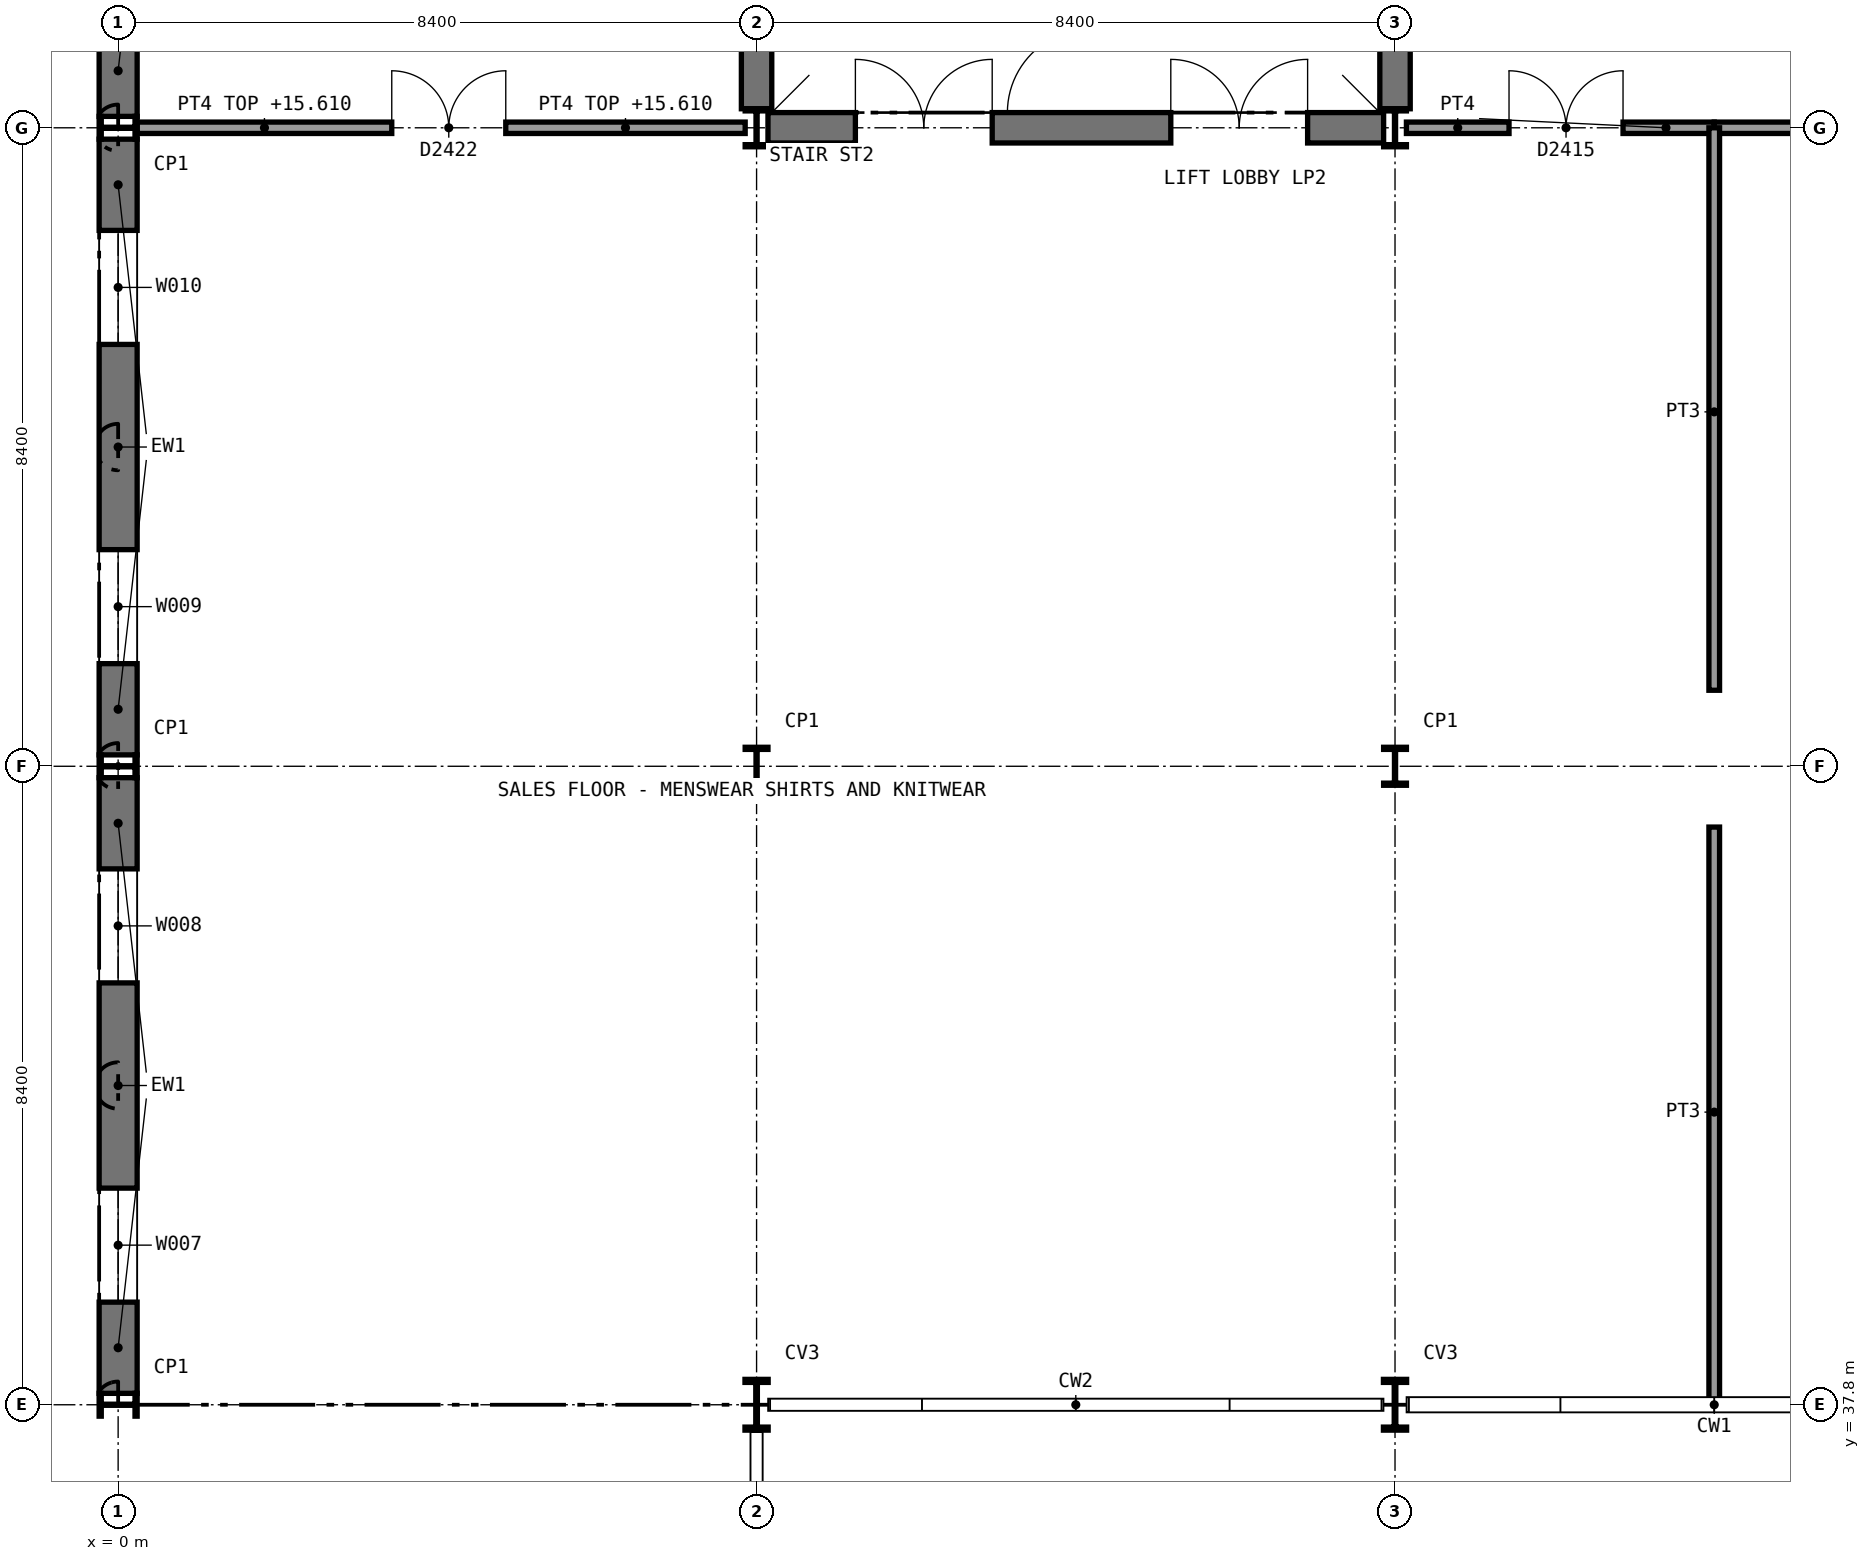
"""IFC4 building model, lengths in metres.
Left out: names, types, materials, properties, quantities, classifications, styles, units other than length and angle.
Written with IfcOpenShell. Run it as: python <this file> out.ifc"""

import sys

from ifc_helpers import new_model, si_unit, direction, frame, frame_2d, origin, origin_2d, place, context, subcontext, project, spatial, rectangle, i_section, extrude, element, fill, save


model = new_model("IFC4")
c1 = context("Model", 3, precision=1e-05, world=origin(), true_north=direction((0.0, 1.0)))
c2 = subcontext(c1, "Body", "Model", "MODEL_VIEW")
j1 = project(units=[si_unit("LENGTHUNIT", "METRE"), si_unit("PLANEANGLEUNIT", "RADIAN")], contexts=[c1])
p1 = place(None, origin())
s1 = spatial("IfcSite", under=j1, at=p1, CompositionType="ELEMENT")
p2 = place(p1, origin())
s2 = spatial("IfcBuilding", under=s1, at=p2, CompositionType="ELEMENT")
p3 = place(p2, frame((0.0, 0.0, 11.4)))
s3 = spatial("IfcBuildingStorey", under=s2, at=p3, CompositionType="ELEMENT", Elevation=11.4)
p4 = place(p3, frame((8.55, 54.6, 0.0), z_axis=(0.0, 0.0, 1.0), x_axis=(1.0, 0.0, 0.0)))
e1 = element("IfcWall", 1, at=p4, inside=s3, PredefinedType="SHEAR", context=c2, shape_type="SweptSolid", body=[
    extrude(rectangle(XDim=8.1, YDim=0.4, at=frame_2d((4.05, 0.0))), origin(), (0.0, 0.0, 1.0), 4.65),
])
p5 = place(p4, frame((1.15, 0.0, 0.0)))
e2 = element("IfcOpeningElement", 2, at=p5, cuts=e1, PredefinedType="OPENING", context=c2, shape_type="SweptSolid", body=[
    extrude(rectangle(XDim=1.8, YDim=2.1, at=frame_2d((0.9, 1.05))), frame((0.0, 0.21, 0.0), z_axis=(0.0, -1.0, 0.0), x_axis=(1.0, 0.0, 0.0)), (0.0, 0.0, 1.0), 0.42),
])
p6 = place(p4, frame((5.3, 0.0, 0.0)))
e3 = element("IfcOpeningElement", 3, at=p6, cuts=e1, PredefinedType="OPENING", context=c2, shape_type="SweptSolid", body=[
    extrude(rectangle(XDim=1.8, YDim=2.1, at=frame_2d((0.9, 1.05))), frame((0.0, 0.21, 0.0), z_axis=(0.0, -1.0, 0.0), x_axis=(1.0, 0.0, 0.0)), (0.0, 0.0, 1.0), 0.42),
])
for number, where, z_axis, x_axis in (
    (4, (8.4, 54.85, 0.0), (0.0, 0.0, 1.0), (0.0, 1.0, 0.0)),
    (5, (16.8, 54.85, 0.0), (0.0, 0.0, 1.0), (0.0, 1.0, 0.0)),
):
    element("IfcWall", number, at=place(p3, frame(where, z_axis=z_axis, x_axis=x_axis)), inside=s3, PredefinedType="SHEAR", context=c2, shape_type="SweptSolid", body=[
        extrude(rectangle(XDim=7.9, YDim=0.4, at=frame_2d((3.95, 0.0))), origin(), (0.0, 0.0, 1.0), 4.65),
    ])
for number, where, z_axis, x_axis in (
    (6, (0.0, 37.8, 0.0), (0.0, 0.0, 1.0), (0.0, 1.0, 0.0)),
    (7, (0.0, 46.2, 0.0), (0.0, 0.0, 1.0), (0.0, 1.0, 0.0)),
    (8, (0.0, 54.6, 0.0), (0.0, 0.0, 1.0), (0.0, 1.0, 0.0)),
):
    element("IfcColumn", number, at=place(p3, frame(where, z_axis=z_axis, x_axis=x_axis)), inside=s3, PredefinedType="COLUMN", context=c2, shape_type="SweptSolid", body=[
        extrude(i_section(OverallWidth=0.3, OverallDepth=0.5, WebThickness=0.014, FlangeThickness=0.028, FilletRadius=0.027, at=origin_2d()), origin(), (0.0, 0.0, 1.0), 4.8),
    ])
p7 = place(p3, frame((8.4, 37.8, 0.0), z_axis=(0.0, 0.0, 1.0), x_axis=(1.0, 0.0, 0.0)))
e9 = element("IfcColumn", 9, at=p7, inside=s3, PredefinedType="COLUMN", context=c2, shape_type="SweptSolid", body=[
    extrude(i_section(OverallWidth=0.305, OverallDepth=0.668, WebThickness=0.021, FlangeThickness=0.04, FilletRadius=0.027, at=origin_2d()), origin(), (0.0, 0.0, 1.0), 4.8),
])
for number, where, z_axis, x_axis in (
    (10, (8.4, 46.2, 0.0), (0.0, 0.0, 1.0), (1.0, 0.0, 0.0)),
    (11, (8.4, 54.6, 0.0), (0.0, 0.0, 1.0), (1.0, 0.0, 0.0)),
):
    element("IfcColumn", number, at=place(p3, frame(where, z_axis=z_axis, x_axis=x_axis)), inside=s3, PredefinedType="COLUMN", context=c2, shape_type="SweptSolid", body=[
        extrude(i_section(OverallWidth=0.3, OverallDepth=0.5, WebThickness=0.014, FlangeThickness=0.028, FilletRadius=0.027, at=origin_2d()), origin(), (0.0, 0.0, 1.0), 4.8),
    ])
p8 = place(p3, frame((16.8, 37.8, 0.0), z_axis=(0.0, 0.0, 1.0), x_axis=(1.0, 0.0, 0.0)))
e12 = element("IfcColumn", 12, at=p8, inside=s3, PredefinedType="COLUMN", context=c2, shape_type="SweptSolid", body=[
    extrude(i_section(OverallWidth=0.305, OverallDepth=0.668, WebThickness=0.021, FlangeThickness=0.04, FilletRadius=0.027, at=origin_2d()), origin(), (0.0, 0.0, 1.0), 4.8),
])
for number, where, z_axis, x_axis in (
    (13, (16.8, 46.2, 0.0), (0.0, 0.0, 1.0), (1.0, 0.0, 0.0)),
    (14, (16.8, 54.6, 0.0), (0.0, 0.0, 1.0), (1.0, 0.0, 0.0)),
):
    element("IfcColumn", number, at=place(p3, frame(where, z_axis=z_axis, x_axis=x_axis)), inside=s3, PredefinedType="COLUMN", context=c2, shape_type="SweptSolid", body=[
        extrude(i_section(OverallWidth=0.3, OverallDepth=0.5, WebThickness=0.014, FlangeThickness=0.028, FilletRadius=0.027, at=origin_2d()), origin(), (0.0, 0.0, 1.0), 4.8),
    ])
p9 = place(p3, frame((16.95, 54.6, 0.0), z_axis=(0.0, 0.0, 1.0), x_axis=(1.0, 0.0, 0.0)))
e15 = element("IfcWall", 15, at=p9, inside=s3, PredefinedType="SOLIDWALL", context=c2, shape_type="SweptSolid", body=[
    extrude(rectangle(XDim=4.05, YDim=0.15, at=frame_2d((2.025, 0.0))), origin(), (0.0, 0.0, 1.0), 4.32),
])
p10 = place(p9, frame((1.35, 0.0, 0.0)))
e16 = element("IfcOpeningElement", 16, at=p10, cuts=e15, PredefinedType="OPENING", context=c2, shape_type="SweptSolid", body=[
    extrude(rectangle(XDim=1.5, YDim=2.1, at=frame_2d((0.75, 1.05))), frame((0.0, 0.085, 0.0), z_axis=(0.0, -1.0, 0.0), x_axis=(1.0, 0.0, 0.0)), (0.0, 0.0, 1.0), 0.17),
])
p11 = place(p3, frame((21.0, 54.6, 0.0), z_axis=(0.0, 0.0, 1.0), x_axis=(1.0, 0.0, 0.0)))
e17 = element("IfcWall", 17, at=p11, inside=s3, PredefinedType="SOLIDWALL", context=c2, shape_type="SweptSolid", body=[
    extrude(rectangle(XDim=4.05, YDim=0.15, at=frame_2d((2.025, 0.0))), origin(), (0.0, 0.0, 1.0), 4.32),
])
p12 = place(p3, frame((0.25, 54.6, 0.0), z_axis=(0.0, 0.0, 1.0), x_axis=(1.0, 0.0, 0.0)))
e18 = element("IfcWall", 18, at=p12, inside=s3, PredefinedType="SOLIDWALL", context=c2, shape_type="SweptSolid", body=[
    extrude(rectangle(XDim=8.0, YDim=0.15, at=frame_2d((4.0, 0.0))), origin(), (0.0, 0.0, 1.0), 4.21),
])
p13 = place(p12, frame((3.35, 0.0, 0.0)))
e19 = element("IfcOpeningElement", 19, at=p13, cuts=e18, PredefinedType="OPENING", context=c2, shape_type="SweptSolid", body=[
    extrude(rectangle(XDim=1.5, YDim=2.1, at=frame_2d((0.75, 1.05))), frame((0.0, 0.085, 0.0), z_axis=(0.0, -1.0, 0.0), x_axis=(1.0, 0.0, 0.0)), (0.0, 0.0, 1.0), 0.17),
])
p14 = place(p3, frame((21.0, 37.8, 0.0), z_axis=(0.0, 0.0, 1.0), x_axis=(0.0, 1.0, 0.0)))
e20 = element("IfcWall", 20, at=p14, inside=s3, PredefinedType="PARTITIONING", context=c2, shape_type="SweptSolid", body=[
    extrude(rectangle(XDim=7.6, YDim=0.14, at=frame_2d((3.8, 0.0))), origin(), (0.0, 0.0, 1.0), 4.65),
])
p15 = place(p3, frame((21.0, 47.2, 0.0), z_axis=(0.0, 0.0, 1.0), x_axis=(0.0, 1.0, 0.0)))
e21 = element("IfcWall", 21, at=p15, inside=s3, PredefinedType="PARTITIONING", context=c2, shape_type="SweptSolid", body=[
    extrude(rectangle(XDim=7.4, YDim=0.14, at=frame_2d((3.7, 0.0))), origin(), (0.0, 0.0, 1.0), 4.65),
])
p16 = place(p3, frame((0.0, 37.95, 0.0), z_axis=(0.0, 0.0, 1.0), x_axis=(0.0, 1.0, 0.0)))
e22 = element("IfcWall", 22, at=p16, inside=s3, PredefinedType="STANDARD", context=c2, shape_type="SweptSolid", body=[
    extrude(rectangle(XDim=8.1, YDim=0.5, at=frame_2d((4.05, 0.0))), origin(), (0.0, 0.0, 1.0), 4.65),
])
p17 = place(p16, frame((1.2, 0.0, 0.9)))
e23 = element("IfcOpeningElement", 23, at=p17, cuts=e22, PredefinedType="OPENING", context=c2, shape_type="SweptSolid", body=[
    extrude(rectangle(XDim=1.5, YDim=3.0, at=frame_2d((0.75, 1.5))), frame((0.0, 0.26, 0.0), z_axis=(0.0, -1.0, 0.0), x_axis=(1.0, 0.0, 0.0)), (0.0, 0.0, 1.0), 0.52),
])
p18 = place(p16, frame((5.4, 0.0, 0.9)))
e24 = element("IfcOpeningElement", 24, at=p18, cuts=e22, PredefinedType="OPENING", context=c2, shape_type="SweptSolid", body=[
    extrude(rectangle(XDim=1.5, YDim=3.0, at=frame_2d((0.75, 1.5))), frame((0.0, 0.26, 0.0), z_axis=(0.0, -1.0, 0.0), x_axis=(1.0, 0.0, 0.0)), (0.0, 0.0, 1.0), 0.52),
])
p19 = place(p3, frame((0.0, 46.35, 0.0), z_axis=(0.0, 0.0, 1.0), x_axis=(0.0, 1.0, 0.0)))
e25 = element("IfcWall", 25, at=p19, inside=s3, PredefinedType="STANDARD", context=c2, shape_type="SweptSolid", body=[
    extrude(rectangle(XDim=8.1, YDim=0.5, at=frame_2d((4.05, 0.0))), origin(), (0.0, 0.0, 1.0), 4.65),
])
p20 = place(p19, frame((1.2, 0.0, 0.9)))
e26 = element("IfcOpeningElement", 26, at=p20, cuts=e25, PredefinedType="OPENING", context=c2, shape_type="SweptSolid", body=[
    extrude(rectangle(XDim=1.5, YDim=3.0, at=frame_2d((0.75, 1.5))), frame((0.0, 0.26, 0.0), z_axis=(0.0, -1.0, 0.0), x_axis=(1.0, 0.0, 0.0)), (0.0, 0.0, 1.0), 0.52),
])
p21 = place(p19, frame((5.4, 0.0, 0.9)))
e27 = element("IfcOpeningElement", 27, at=p21, cuts=e25, PredefinedType="OPENING", context=c2, shape_type="SweptSolid", body=[
    extrude(rectangle(XDim=1.5, YDim=3.0, at=frame_2d((0.75, 1.5))), frame((0.0, 0.26, 0.0), z_axis=(0.0, -1.0, 0.0), x_axis=(1.0, 0.0, 0.0)), (0.0, 0.0, 1.0), 0.52),
])
p22 = place(p3, frame((0.0, 54.75, 0.0), z_axis=(0.0, 0.0, 1.0), x_axis=(0.0, 1.0, 0.0)))
e28 = element("IfcWall", 28, at=p22, inside=s3, PredefinedType="STANDARD", context=c2, shape_type="SweptSolid", body=[
    extrude(rectangle(XDim=8.1, YDim=0.5, at=frame_2d((4.05, 0.0))), origin(), (0.0, 0.0, 1.0), 4.65),
])
p23 = place(p22, frame((1.2, 0.0, 0.9)))
e29 = element("IfcOpeningElement", 29, at=p23, cuts=e28, PredefinedType="OPENING", context=c2, shape_type="SweptSolid", body=[
    extrude(rectangle(XDim=1.5, YDim=3.0, at=frame_2d((0.75, 1.5))), frame((0.0, 0.26, 0.0), z_axis=(0.0, -1.0, 0.0), x_axis=(1.0, 0.0, 0.0)), (0.0, 0.0, 1.0), 0.52),
])
p24 = place(p22, frame((5.4, 0.0, 0.9)))
e30 = element("IfcOpeningElement", 30, at=p24, cuts=e28, PredefinedType="OPENING", context=c2, shape_type="SweptSolid", body=[
    extrude(rectangle(XDim=1.5, YDim=3.0, at=frame_2d((0.75, 1.5))), frame((0.0, 0.26, 0.0), z_axis=(0.0, -1.0, 0.0), x_axis=(1.0, 0.0, 0.0)), (0.0, 0.0, 1.0), 0.52),
])
p25 = place(p3, frame((12.8, 62.8, 0.0), z_axis=(0.0, 0.0, 1.0), x_axis=(0.0, -1.0, 0.0)))
e31 = element("IfcWall", 31, at=p25, inside=s3, PredefinedType="SHEAR", context=c2, shape_type="SweptSolid", body=[
    extrude(rectangle(XDim=8.0, YDim=0.2, at=frame_2d((4.0, 0.0))), origin(), (0.0, 0.0, 1.0), 4.65),
])
p26 = place(p25, frame((6.9, 0.0, 0.0)))
e32 = element("IfcOpeningElement", 32, at=p26, cuts=e31, PredefinedType="OPENING", context=c2, shape_type="SweptSolid", body=[
    extrude(rectangle(XDim=1.11, YDim=2.1, at=frame_2d((0.555, 1.05))), frame((0.0, 0.11, 0.0), z_axis=(0.0, -1.0, 0.0), x_axis=(1.0, 0.0, 0.0)), (0.0, 0.0, 1.0), 0.22),
])
p27 = place(p10, origin())
e33 = element("IfcDoor", 33, at=p27, inside=s3, OperationType="DOUBLE_DOOR_SINGLE_SWING", PredefinedType="DOOR", context=c2, shape_type="SweptSolid", body=[
    extrude(rectangle(XDim=1.5, YDim=2.1, at=frame_2d((0.75, 1.05))), frame((0.0, 0.025, 0.0), z_axis=(0.0, -1.0, 0.0), x_axis=(1.0, 0.0, 0.0)), (0.0, 0.0, 1.0), 0.05),
])
fill(e16, e33)
p28 = place(p13, origin())
e34 = element("IfcDoor", 34, at=p28, inside=s3, OperationType="DOUBLE_DOOR_SINGLE_SWING", PredefinedType="DOOR", context=c2, shape_type="SweptSolid", body=[
    extrude(rectangle(XDim=1.5, YDim=2.1, at=frame_2d((0.75, 1.05))), frame((0.0, 0.025, 0.0), z_axis=(0.0, -1.0, 0.0), x_axis=(1.0, 0.0, 0.0)), (0.0, 0.0, 1.0), 0.05),
])
fill(e19, e34)
p29 = place(p17, origin())
e35 = element("IfcWindow", 35, at=p29, inside=s3, PartitioningType="SINGLE_PANEL", PredefinedType="WINDOW", context=c2, shape_type="SweptSolid", body=[
    extrude(rectangle(XDim=1.5, YDim=3.0, at=frame_2d((0.75, 1.5))), frame((0.0, 0.03, 0.0), z_axis=(0.0, -1.0, 0.0), x_axis=(1.0, 0.0, 0.0)), (0.0, 0.0, 1.0), 0.06),
])
fill(e23, e35)
p30 = place(p18, origin())
e36 = element("IfcWindow", 36, at=p30, inside=s3, PartitioningType="SINGLE_PANEL", PredefinedType="WINDOW", context=c2, shape_type="SweptSolid", body=[
    extrude(rectangle(XDim=1.5, YDim=3.0, at=frame_2d((0.75, 1.5))), frame((0.0, 0.03, 0.0), z_axis=(0.0, -1.0, 0.0), x_axis=(1.0, 0.0, 0.0)), (0.0, 0.0, 1.0), 0.06),
])
fill(e24, e36)
p31 = place(p20, origin())
e37 = element("IfcWindow", 37, at=p31, inside=s3, PartitioningType="SINGLE_PANEL", PredefinedType="WINDOW", context=c2, shape_type="SweptSolid", body=[
    extrude(rectangle(XDim=1.5, YDim=3.0, at=frame_2d((0.75, 1.5))), frame((0.0, 0.03, 0.0), z_axis=(0.0, -1.0, 0.0), x_axis=(1.0, 0.0, 0.0)), (0.0, 0.0, 1.0), 0.06),
])
fill(e26, e37)
p32 = place(p21, origin())
e38 = element("IfcWindow", 38, at=p32, inside=s3, PartitioningType="SINGLE_PANEL", PredefinedType="WINDOW", context=c2, shape_type="SweptSolid", body=[
    extrude(rectangle(XDim=1.5, YDim=3.0, at=frame_2d((0.75, 1.5))), frame((0.0, 0.03, 0.0), z_axis=(0.0, -1.0, 0.0), x_axis=(1.0, 0.0, 0.0)), (0.0, 0.0, 1.0), 0.06),
])
fill(e27, e38)
p33 = place(p26, frame((1.1, 0.0, 0.0), z_axis=(0.0, 0.0, 1.0), x_axis=(-1.0, 0.0, 0.0)))
e39 = element("IfcDoor", 39, at=p33, inside=s3, OperationType="SINGLE_SWING_LEFT", PredefinedType="DOOR", context=c2, shape_type="SweptSolid", body=[
    extrude(rectangle(XDim=1.1, YDim=2.1, at=frame_2d((0.55, 1.05))), frame((0.0, 0.025, 0.0), z_axis=(0.0, -1.0, 0.0), x_axis=(1.0, 0.0, 0.0)), (0.0, 0.0, 1.0), 0.05),
])
fill(e32, e39)
p34 = place(p5, origin())
e40 = element("IfcDoor", 40, at=p34, inside=s3, OperationType="DOUBLE_DOOR_SINGLE_SWING", PredefinedType="DOOR", context=c2, shape_type="SweptSolid", body=[
    extrude(rectangle(XDim=1.8, YDim=2.1, at=frame_2d((0.9, 1.05))), frame((0.0, 0.025, 0.0), z_axis=(0.0, -1.0, 0.0), x_axis=(1.0, 0.0, 0.0)), (0.0, 0.0, 1.0), 0.05),
])
fill(e2, e40)
p35 = place(p6, origin())
e41 = element("IfcDoor", 41, at=p35, inside=s3, OperationType="DOUBLE_DOOR_SINGLE_SWING", PredefinedType="DOOR", context=c2, shape_type="SweptSolid", body=[
    extrude(rectangle(XDim=1.8, YDim=2.1, at=frame_2d((0.9, 1.05))), frame((0.0, 0.025, 0.0), z_axis=(0.0, -1.0, 0.0), x_axis=(1.0, 0.0, 0.0)), (0.0, 0.0, 1.0), 0.05),
])
fill(e3, e41)
save(model, sys.argv[1])
